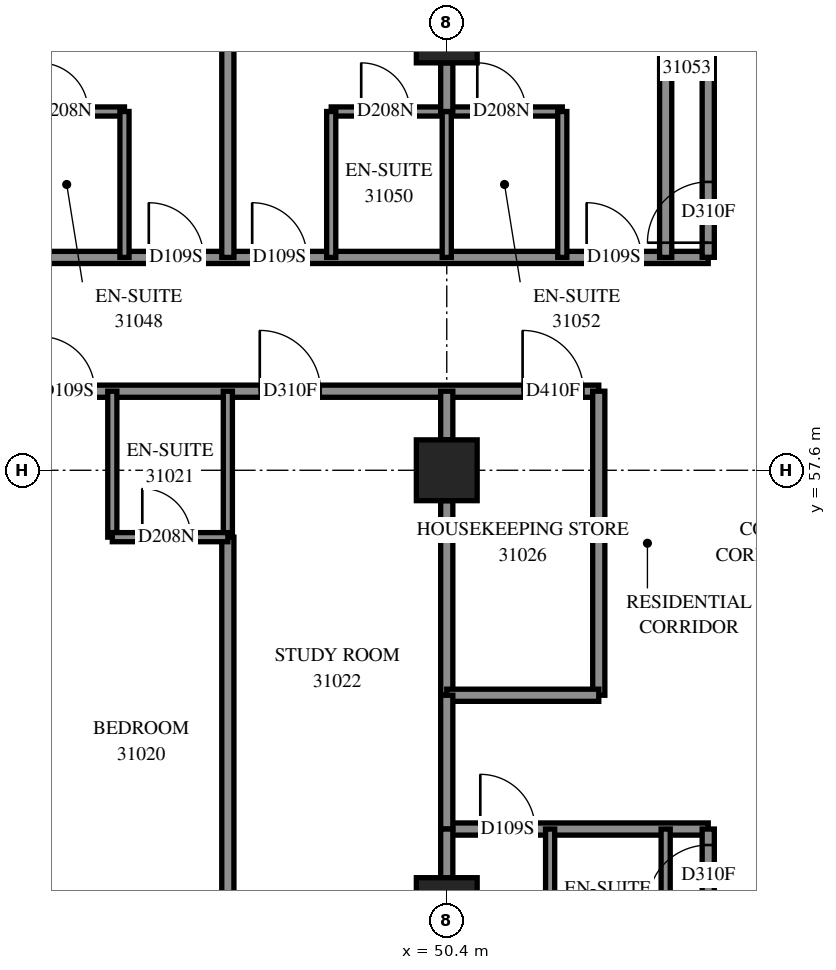
"""IFC4 building model, lengths in metres.
Left out: names, types, materials, properties, quantities, classifications, styles, units other than length and angle.
Written with IfcOpenShell. Run it as: python <this file> out.ifc"""

import sys

from ifc_helpers import new_model, si_unit, direction, frame, frame_2d, origin, origin_2d, place, context, subcontext, project, spatial, rectangle, extrude, element, fill, save


model = new_model("IFC4")
c1 = context("Model", 3, precision=1e-05, world=origin(), true_north=direction((0.0, 1.0)))
c2 = subcontext(c1, "Body", "Model", "MODEL_VIEW")
j1 = project(units=[si_unit("LENGTHUNIT", "METRE"), si_unit("PLANEANGLEUNIT", "RADIAN")], contexts=[c1])
p1 = place(None, origin())
s1 = spatial("IfcSite", under=j1, at=p1, CompositionType="ELEMENT")
p2 = place(p1, origin())
s2 = spatial("IfcBuilding", under=s1, at=p2, CompositionType="ELEMENT")
p3 = place(p2, frame((0.0, 0.0, 115.2)))
s3 = spatial("IfcBuildingStorey", under=s2, at=p3, CompositionType="ELEMENT", Elevation=115.2)
for number, where, z_axis, x_axis in (
    (1, (50.4, 50.4, 0.0), (0.0, 0.0, 1.0), (1.0, 0.0, 0.0)),
    (2, (50.4, 57.6, 0.0), (0.0, 0.0, 1.0), (1.0, 0.0, 0.0)),
    (3, (50.4, 64.8, 0.0), (0.0, 0.0, 1.0), (1.0, 0.0, 0.0)),
):
    element("IfcColumn", number, at=place(p3, frame(where, z_axis=z_axis, x_axis=x_axis)), inside=s3, PredefinedType="COLUMN", context=c2, shape_type="SweptSolid", body=[
        extrude(rectangle(XDim=1.0, YDim=1.0, at=origin_2d()), origin(), (0.0, 0.0, 1.0), 3.1),
    ])
p4 = place(p3, frame((28.802, 58.9, 0.0), z_axis=(0.0, 0.0, 1.0), x_axis=(1.0, 0.0, 0.0)))
e4 = element("IfcWall", 4, at=p4, inside=s3, PredefinedType="PARTITIONING", context=c2, shape_type="SweptSolid", body=[
    extrude(rectangle(XDim=24.098, YDim=0.2, at=frame_2d((12.049, 0.0))), origin(), (0.0, 0.0, 1.0), 3.1),
])
p5 = place(p4, frame((11.323, 0.0, 0.0)))
e5 = element("IfcOpeningElement", 5, at=p5, cuts=e4, PredefinedType="OPENING", context=c2, shape_type="SweptSolid", body=[
    extrude(rectangle(XDim=1.0, YDim=2.1, at=frame_2d((0.5, 1.05))), frame((0.0, 0.11, 0.0), z_axis=(0.0, -1.0, 0.0), x_axis=(1.0, 0.0, 0.0)), (0.0, 0.0, 1.0), 0.22),
])
p6 = place(p4, frame((14.908, 0.0, 0.0)))
e6 = element("IfcOpeningElement", 6, at=p6, cuts=e4, PredefinedType="OPENING", context=c2, shape_type="SweptSolid", body=[
    extrude(rectangle(XDim=0.9, YDim=2.1, at=frame_2d((0.45, 1.05))), frame((0.0, 0.11, 0.0), z_axis=(0.0, -1.0, 0.0), x_axis=(1.0, 0.0, 0.0)), (0.0, 0.0, 1.0), 0.22),
])
p7 = place(p4, frame((18.523, 0.0, 0.0)))
e7 = element("IfcOpeningElement", 7, at=p7, cuts=e4, PredefinedType="OPENING", context=c2, shape_type="SweptSolid", body=[
    extrude(rectangle(XDim=1.0, YDim=2.1, at=frame_2d((0.5, 1.05))), frame((0.0, 0.11, 0.0), z_axis=(0.0, -1.0, 0.0), x_axis=(1.0, 0.0, 0.0)), (0.0, 0.0, 1.0), 0.22),
])
p8 = place(p4, frame((22.845, 0.0, 0.0)))
e8 = element("IfcOpeningElement", 8, at=p8, cuts=e4, PredefinedType="OPENING", context=c2, shape_type="SweptSolid", body=[
    extrude(rectangle(XDim=1.0, YDim=2.1, at=frame_2d((0.5, 1.05))), frame((0.0, 0.11, 0.0), z_axis=(0.0, -1.0, 0.0), x_axis=(1.0, 0.0, 0.0)), (0.0, 0.0, 1.0), 0.22),
])
p9 = place(p3, frame((33.502, 61.1, 0.0), z_axis=(0.0, 0.0, 1.0), x_axis=(1.0, 0.0, 0.0)))
e9 = element("IfcWall", 9, at=p9, inside=s3, PredefinedType="PARTITIONING", context=c2, shape_type="SweptSolid", body=[
    extrude(rectangle(XDim=21.198, YDim=0.2, at=frame_2d((10.599, 0.0))), origin(), (0.0, 0.0, 1.0), 3.1),
])
p10 = place(p9, frame((4.798, 0.0, 0.0)))
e10 = element("IfcOpeningElement", 10, at=p10, cuts=e9, PredefinedType="OPENING", context=c2, shape_type="SweptSolid", body=[
    extrude(rectangle(XDim=0.9, YDim=2.1, at=frame_2d((0.45, 1.05))), frame((0.0, 0.11, 0.0), z_axis=(0.0, -1.0, 0.0), x_axis=(1.0, 0.0, 0.0)), (0.0, 0.0, 1.0), 0.22),
])
p11 = place(p9, frame((6.498, 0.0, 0.0)))
e11 = element("IfcOpeningElement", 11, at=p11, cuts=e9, PredefinedType="OPENING", context=c2, shape_type="SweptSolid", body=[
    extrude(rectangle(XDim=0.9, YDim=2.1, at=frame_2d((0.45, 1.05))), frame((0.0, 0.11, 0.0), z_axis=(0.0, -1.0, 0.0), x_axis=(1.0, 0.0, 0.0)), (0.0, 0.0, 1.0), 0.22),
])
p12 = place(p9, frame((11.998, 0.0, 0.0)))
e12 = element("IfcOpeningElement", 12, at=p12, cuts=e9, PredefinedType="OPENING", context=c2, shape_type="SweptSolid", body=[
    extrude(rectangle(XDim=0.9, YDim=2.1, at=frame_2d((0.45, 1.05))), frame((0.0, 0.11, 0.0), z_axis=(0.0, -1.0, 0.0), x_axis=(1.0, 0.0, 0.0)), (0.0, 0.0, 1.0), 0.22),
])
p13 = place(p9, frame((13.698, 0.0, 0.0)))
e13 = element("IfcOpeningElement", 13, at=p13, cuts=e9, PredefinedType="OPENING", context=c2, shape_type="SweptSolid", body=[
    extrude(rectangle(XDim=0.9, YDim=2.1, at=frame_2d((0.45, 1.05))), frame((0.0, 0.11, 0.0), z_axis=(0.0, -1.0, 0.0), x_axis=(1.0, 0.0, 0.0)), (0.0, 0.0, 1.0), 0.22),
])
p14 = place(p9, frame((19.198, 0.0, 0.0)))
e14 = element("IfcOpeningElement", 14, at=p14, cuts=e9, PredefinedType="OPENING", context=c2, shape_type="SweptSolid", body=[
    extrude(rectangle(XDim=0.9, YDim=2.1, at=frame_2d((0.45, 1.05))), frame((0.0, 0.11, 0.0), z_axis=(0.0, -1.0, 0.0), x_axis=(1.0, 0.0, 0.0)), (0.0, 0.0, 1.0), 0.22),
])
p15 = place(p3, frame((46.8, 61.1, 0.0), z_axis=(0.0, 0.0, 1.0), x_axis=(0.0, 1.0, 0.0)))
e15 = element("IfcWall", 15, at=p15, inside=s3, PredefinedType="PARTITIONING", context=c2, shape_type="SweptSolid", body=[
    extrude(rectangle(XDim=11.688, YDim=0.2, at=frame_2d((5.844, 0.0))), origin(), (0.0, 0.0, 1.0), 3.1),
])
p16 = place(p3, frame((54.0, 61.1, 0.0), z_axis=(0.0, 0.0, 1.0), x_axis=(0.0, 1.0, 0.0)))
e16 = element("IfcWall", 16, at=p16, inside=s3, PredefinedType="PARTITIONING", context=c2, shape_type="SweptSolid", body=[
    extrude(rectangle(XDim=11.621, YDim=0.2, at=frame_2d((5.811, 0.0))), origin(), (0.0, 0.0, 1.0), 3.1),
])
p17 = place(p3, frame((46.8, 49.75, 0.0), z_axis=(0.0, 0.0, 1.0), x_axis=(0.0, 1.0, 0.0)))
e17 = element("IfcWall", 17, at=p17, inside=s3, PredefinedType="PARTITIONING", context=c2, shape_type="SweptSolid", body=[
    extrude(rectangle(XDim=6.75, YDim=0.2, at=frame_2d((3.375, 0.0))), origin(), (0.0, 0.0, 1.0), 3.1),
])
p18 = place(p3, frame((54.7, 61.102, 0.0), z_axis=(0.0, 0.0, 1.0), x_axis=(0.0, 1.0, 0.0)))
e18 = element("IfcWall", 18, at=p18, inside=s3, PredefinedType="PARTITIONING", context=c2, shape_type="SweptSolid", body=[
    extrude(rectangle(XDim=6.598, YDim=0.2, at=frame_2d((3.299, 0.0))), origin(), (0.0, 0.0, 1.0), 3.1),
])
p19 = place(p18, frame((0.24, 0.0, 0.0)))
e19 = element("IfcOpeningElement", 19, at=p19, cuts=e18, PredefinedType="OPENING", context=c2, shape_type="SweptSolid", body=[
    extrude(rectangle(XDim=1.0, YDim=2.1, at=frame_2d((0.5, 1.05))), frame((0.0, 0.11, 0.0), z_axis=(0.0, -1.0, 0.0), x_axis=(1.0, 0.0, 0.0)), (0.0, 0.0, 1.0), 0.22),
])
p20 = place(p3, frame((52.9, 53.9, 0.0), z_axis=(0.0, 0.0, 1.0), x_axis=(0.0, 1.0, 0.0)))
e20 = element("IfcWall", 20, at=p20, inside=s3, PredefinedType="PARTITIONING", context=c2, shape_type="SweptSolid", body=[
    extrude(rectangle(XDim=5.0, YDim=0.2, at=frame_2d((2.5, 0.0))), origin(), (0.0, 0.0, 1.0), 3.1),
])
p21 = place(p3, frame((50.4, 51.7, 0.0), z_axis=(0.0, 0.0, 1.0), x_axis=(1.0, 0.0, 0.0)))
e21 = element("IfcWall", 21, at=p21, inside=s3, PredefinedType="PARTITIONING", context=c2, shape_type="SweptSolid", body=[
    extrude(rectangle(XDim=4.3, YDim=0.2, at=frame_2d((2.15, 0.0))), origin(), (0.0, 0.0, 1.0), 3.1),
])
p22 = place(p21, frame((0.552, 0.0, 0.0)))
e22 = element("IfcOpeningElement", 22, at=p22, cuts=e21, PredefinedType="OPENING", context=c2, shape_type="SweptSolid", body=[
    extrude(rectangle(XDim=0.9, YDim=2.1, at=frame_2d((0.45, 1.05))), frame((0.0, 0.11, 0.0), z_axis=(0.0, -1.0, 0.0), x_axis=(1.0, 0.0, 0.0)), (0.0, 0.0, 1.0), 0.22),
])
p23 = place(p3, frame((54.7, 47.5, 0.0), z_axis=(0.0, 0.0, 1.0), x_axis=(0.0, 1.0, 0.0)))
e23 = element("IfcWall", 23, at=p23, inside=s3, PredefinedType="PARTITIONING", context=c2, shape_type="SweptSolid", body=[
    extrude(rectangle(XDim=4.2, YDim=0.2, at=frame_2d((2.1, 0.0))), origin(), (0.0, 0.0, 1.0), 3.1),
])
p24 = place(p23, frame((2.937, 0.0, 0.0)))
e24 = element("IfcOpeningElement", 24, at=p24, cuts=e23, PredefinedType="OPENING", context=c2, shape_type="SweptSolid", body=[
    extrude(rectangle(XDim=1.0, YDim=2.1, at=frame_2d((0.5, 1.05))), frame((0.0, 0.11, 0.0), z_axis=(0.0, -1.0, 0.0), x_axis=(1.0, 0.0, 0.0)), (0.0, 0.0, 1.0), 0.22),
])
p25 = place(p3, frame((41.3, 63.5, 0.0), z_axis=(0.0, 0.0, 1.0), x_axis=(1.0, 0.0, 0.0)))
e25 = element("IfcWall", 25, at=p25, inside=s3, PredefinedType="PARTITIONING", context=c2, shape_type="SweptSolid", body=[
    extrude(rectangle(XDim=3.8, YDim=0.15, at=frame_2d((1.9, 0.0))), origin(), (0.0, 0.0, 1.0), 3.1),
])
p26 = place(p25, frame((0.493, 0.0, 0.0)))
e26 = element("IfcOpeningElement", 26, at=p26, cuts=e25, PredefinedType="OPENING", context=c2, shape_type="SweptSolid", body=[
    extrude(rectangle(XDim=0.8, YDim=2.1, at=frame_2d((0.4, 1.05))), frame((0.0, 0.085, 0.0), z_axis=(0.0, -1.0, 0.0), x_axis=(1.0, 0.0, 0.0)), (0.0, 0.0, 1.0), 0.17),
])
p27 = place(p25, frame((2.402, 0.0, 0.0)))
e27 = element("IfcOpeningElement", 27, at=p27, cuts=e25, PredefinedType="OPENING", context=c2, shape_type="SweptSolid", body=[
    extrude(rectangle(XDim=0.8, YDim=2.1, at=frame_2d((0.4, 1.05))), frame((0.0, 0.085, 0.0), z_axis=(0.0, -1.0, 0.0), x_axis=(1.0, 0.0, 0.0)), (0.0, 0.0, 1.0), 0.17),
])
p28 = place(p3, frame((48.5, 63.5, 0.0), z_axis=(0.0, 0.0, 1.0), x_axis=(1.0, 0.0, 0.0)))
e28 = element("IfcWall", 28, at=p28, inside=s3, PredefinedType="PARTITIONING", context=c2, shape_type="SweptSolid", body=[
    extrude(rectangle(XDim=3.8, YDim=0.15, at=frame_2d((1.9, 0.0))), origin(), (0.0, 0.0, 1.0), 3.1),
])
p29 = place(p28, frame((0.493, 0.0, 0.0)))
e29 = element("IfcOpeningElement", 29, at=p29, cuts=e28, PredefinedType="OPENING", context=c2, shape_type="SweptSolid", body=[
    extrude(rectangle(XDim=0.8, YDim=2.1, at=frame_2d((0.4, 1.05))), frame((0.0, 0.085, 0.0), z_axis=(0.0, -1.0, 0.0), x_axis=(1.0, 0.0, 0.0)), (0.0, 0.0, 1.0), 0.17),
])
p30 = place(p28, frame((2.402, 0.0, 0.0)))
e30 = element("IfcOpeningElement", 30, at=p30, cuts=e28, PredefinedType="OPENING", context=c2, shape_type="SweptSolid", body=[
    extrude(rectangle(XDim=0.8, YDim=2.1, at=frame_2d((0.4, 1.05))), frame((0.0, 0.085, 0.0), z_axis=(0.0, -1.0, 0.0), x_axis=(1.0, 0.0, 0.0)), (0.0, 0.0, 1.0), 0.17),
])
p31 = place(p3, frame((50.4, 53.9, 0.0), z_axis=(0.0, 0.0, 1.0), x_axis=(0.0, 1.0, 0.0)))
e31 = element("IfcWall", 31, at=p31, inside=s3, PredefinedType="PARTITIONING", context=c2, shape_type="SweptSolid", body=[
    extrude(rectangle(XDim=3.2, YDim=0.2, at=frame_2d((1.6, 0.0))), origin(), (0.0, 0.0, 1.0), 3.1),
])
p32 = place(p3, frame((50.4, 53.9, 0.0), z_axis=(0.0, 0.0, 1.0), x_axis=(1.0, 0.0, 0.0)))
e32 = element("IfcWall", 32, at=p32, inside=s3, PredefinedType="PARTITIONING", context=c2, shape_type="SweptSolid", body=[
    extrude(rectangle(XDim=2.5, YDim=0.2, at=frame_2d((1.25, 0.0))), origin(), (0.0, 0.0, 1.0), 3.1),
])
for number, where, z_axis, x_axis in (
    (33, (52.1, 49.3, 0.0), (0.0, 0.0, 1.0), (0.0, 1.0, 0.0)),
    (34, (54.0, 49.3, 0.0), (0.0, 0.0, 1.0), (0.0, 1.0, 0.0)),
    (35, (45.1, 61.1, 0.0), (0.0, 0.0, 1.0), (0.0, 1.0, 0.0)),
    (36, (44.9, 56.5, 0.0), (0.0, 0.0, 1.0), (0.0, 1.0, 0.0)),
    (37, (46.8, 56.5, 0.0), (0.0, 0.0, 1.0), (0.0, 1.0, 0.0)),
    (38, (48.5, 61.1, 0.0), (0.0, 0.0, 1.0), (0.0, 1.0, 0.0)),
    (39, (50.4, 61.1, 0.0), (0.0, 0.0, 1.0), (0.0, 1.0, 0.0)),
    (40, (52.3, 61.1, 0.0), (0.0, 0.0, 1.0), (0.0, 1.0, 0.0)),
):
    element("IfcWall", number, at=place(p3, frame(where, z_axis=z_axis, x_axis=x_axis)), inside=s3, PredefinedType="PARTITIONING", context=c2, shape_type="SweptSolid", body=[
        extrude(rectangle(XDim=2.4, YDim=0.15, at=frame_2d((1.2, 0.0))), origin(), (0.0, 0.0, 1.0), 3.1),
    ])
p33 = place(p3, frame((50.4, 51.7, 0.0), z_axis=(0.0, 0.0, 1.0), x_axis=(0.0, 1.0, 0.0)))
e41 = element("IfcWall", 41, at=p33, inside=s3, PredefinedType="PARTITIONING", context=c2, shape_type="SweptSolid", body=[
    extrude(rectangle(XDim=2.2, YDim=0.2, at=frame_2d((1.1, 0.0))), origin(), (0.0, 0.0, 1.0), 3.1),
])
p34 = place(p3, frame((44.9, 56.5, 0.0), z_axis=(0.0, 0.0, 1.0), x_axis=(1.0, 0.0, 0.0)))
e42 = element("IfcWall", 42, at=p34, inside=s3, PredefinedType="PARTITIONING", context=c2, shape_type="SweptSolid", body=[
    extrude(rectangle(XDim=1.9, YDim=0.15, at=frame_2d((0.95, 0.0))), origin(), (0.0, 0.0, 1.0), 3.1),
])
p35 = place(p34, frame((0.493, 0.0, 0.0)))
e43 = element("IfcOpeningElement", 43, at=p35, cuts=e42, PredefinedType="OPENING", context=c2, shape_type="SweptSolid", body=[
    extrude(rectangle(XDim=0.8, YDim=2.1, at=frame_2d((0.4, 1.05))), frame((0.0, 0.085, 0.0), z_axis=(0.0, -1.0, 0.0), x_axis=(1.0, 0.0, 0.0)), (0.0, 0.0, 1.0), 0.17),
])
for number, where, z_axis, x_axis in (
    (44, (50.4, 50.9, 0.0), (0.0, 0.0, 1.0), (0.0, 1.0, 0.0)),
    (45, (50.4, 58.1, 0.0), (0.0, 0.0, 1.0), (0.0, 1.0, 0.0)),
    (46, (50.4, 63.5, 0.0), (0.0, 0.0, 1.0), (0.0, 1.0, 0.0)),
):
    element("IfcWall", number, at=place(p3, frame(where, z_axis=z_axis, x_axis=x_axis)), inside=s3, PredefinedType="PARTITIONING", context=c2, shape_type="SweptSolid", body=[
        extrude(rectangle(XDim=0.8, YDim=0.2, at=frame_2d((0.4, 0.0))), origin(), (0.0, 0.0, 1.0), 3.1),
    ])
p36 = place(p6, origin())
e47 = element("IfcDoor", 47, at=p36, inside=s3, OperationType="SINGLE_SWING_LEFT", PredefinedType="DOOR", context=c2, shape_type="SweptSolid", body=[
    extrude(rectangle(XDim=0.9, YDim=2.1, at=frame_2d((0.45, 1.05))), frame((0.0, 0.025, 0.0), z_axis=(0.0, -1.0, 0.0), x_axis=(1.0, 0.0, 0.0)), (0.0, 0.0, 1.0), 0.05),
])
fill(e6, e47)
p37 = place(p35, origin())
e48 = element("IfcDoor", 48, at=p37, inside=s3, OperationType="SINGLE_SWING_RIGHT", PredefinedType="DOOR", context=c2, shape_type="SweptSolid", body=[
    extrude(rectangle(XDim=0.8, YDim=2.1, at=frame_2d((0.4, 1.05))), frame((0.0, 0.025, 0.0), z_axis=(0.0, -1.0, 0.0), x_axis=(1.0, 0.0, 0.0)), (0.0, 0.0, 1.0), 0.05),
])
fill(e43, e48)
p38 = place(p7, origin())
e49 = element("IfcDoor", 49, at=p38, inside=s3, OperationType="SINGLE_SWING_RIGHT", PredefinedType="DOOR", context=c2, shape_type="SweptSolid", body=[
    extrude(rectangle(XDim=1.0, YDim=2.1, at=frame_2d((0.5, 1.05))), frame((0.0, 0.025, 0.0), z_axis=(0.0, -1.0, 0.0), x_axis=(1.0, 0.0, 0.0)), (0.0, 0.0, 1.0), 0.05),
])
fill(e7, e49)
p39 = place(p22, origin())
e50 = element("IfcDoor", 50, at=p39, inside=s3, OperationType="SINGLE_SWING_LEFT", PredefinedType="DOOR", context=c2, shape_type="SweptSolid", body=[
    extrude(rectangle(XDim=0.9, YDim=2.1, at=frame_2d((0.45, 1.05))), frame((0.0, 0.025, 0.0), z_axis=(0.0, -1.0, 0.0), x_axis=(1.0, 0.0, 0.0)), (0.0, 0.0, 1.0), 0.05),
])
fill(e22, e50)
p40 = place(p24, origin())
e51 = element("IfcDoor", 51, at=p40, inside=s3, OperationType="SINGLE_SWING_RIGHT", PredefinedType="DOOR", context=c2, shape_type="SweptSolid", body=[
    extrude(rectangle(XDim=1.0, YDim=2.1, at=frame_2d((0.5, 1.05))), frame((0.0, 0.025, 0.0), z_axis=(0.0, -1.0, 0.0), x_axis=(1.0, 0.0, 0.0)), (0.0, 0.0, 1.0), 0.05),
])
fill(e24, e51)
p41 = place(p8, origin())
e52 = element("IfcDoor", 52, at=p41, inside=s3, OperationType="SINGLE_SWING_LEFT", PredefinedType="DOOR", context=c2, shape_type="SweptSolid", body=[
    extrude(rectangle(XDim=1.0, YDim=2.1, at=frame_2d((0.5, 1.05))), frame((0.0, 0.025, 0.0), z_axis=(0.0, -1.0, 0.0), x_axis=(1.0, 0.0, 0.0)), (0.0, 0.0, 1.0), 0.05),
])
fill(e8, e52)
p42 = place(p12, origin())
e53 = element("IfcDoor", 53, at=p42, inside=s3, OperationType="SINGLE_SWING_RIGHT", PredefinedType="DOOR", context=c2, shape_type="SweptSolid", body=[
    extrude(rectangle(XDim=0.9, YDim=2.1, at=frame_2d((0.45, 1.05))), frame((0.0, 0.025, 0.0), z_axis=(0.0, -1.0, 0.0), x_axis=(1.0, 0.0, 0.0)), (0.0, 0.0, 1.0), 0.05),
])
fill(e12, e53)
p43 = place(p27, origin())
e54 = element("IfcDoor", 54, at=p43, inside=s3, OperationType="SINGLE_SWING_RIGHT", PredefinedType="DOOR", context=c2, shape_type="SweptSolid", body=[
    extrude(rectangle(XDim=0.8, YDim=2.1, at=frame_2d((0.4, 1.05))), frame((0.0, 0.025, 0.0), z_axis=(0.0, -1.0, 0.0), x_axis=(1.0, 0.0, 0.0)), (0.0, 0.0, 1.0), 0.05),
])
fill(e27, e54)
p44 = place(p13, origin())
e55 = element("IfcDoor", 55, at=p44, inside=s3, OperationType="SINGLE_SWING_LEFT", PredefinedType="DOOR", context=c2, shape_type="SweptSolid", body=[
    extrude(rectangle(XDim=0.9, YDim=2.1, at=frame_2d((0.45, 1.05))), frame((0.0, 0.025, 0.0), z_axis=(0.0, -1.0, 0.0), x_axis=(1.0, 0.0, 0.0)), (0.0, 0.0, 1.0), 0.05),
])
fill(e13, e55)
p45 = place(p29, origin())
e56 = element("IfcDoor", 56, at=p45, inside=s3, OperationType="SINGLE_SWING_RIGHT", PredefinedType="DOOR", context=c2, shape_type="SweptSolid", body=[
    extrude(rectangle(XDim=0.8, YDim=2.1, at=frame_2d((0.4, 1.05))), frame((0.0, 0.025, 0.0), z_axis=(0.0, -1.0, 0.0), x_axis=(1.0, 0.0, 0.0)), (0.0, 0.0, 1.0), 0.05),
])
fill(e29, e56)
p46 = place(p14, origin())
e57 = element("IfcDoor", 57, at=p46, inside=s3, OperationType="SINGLE_SWING_RIGHT", PredefinedType="DOOR", context=c2, shape_type="SweptSolid", body=[
    extrude(rectangle(XDim=0.9, YDim=2.1, at=frame_2d((0.45, 1.05))), frame((0.0, 0.025, 0.0), z_axis=(0.0, -1.0, 0.0), x_axis=(1.0, 0.0, 0.0)), (0.0, 0.0, 1.0), 0.05),
])
fill(e14, e57)
p47 = place(p30, origin())
e58 = element("IfcDoor", 58, at=p47, inside=s3, OperationType="SINGLE_SWING_RIGHT", PredefinedType="DOOR", context=c2, shape_type="SweptSolid", body=[
    extrude(rectangle(XDim=0.8, YDim=2.1, at=frame_2d((0.4, 1.05))), frame((0.0, 0.025, 0.0), z_axis=(0.0, -1.0, 0.0), x_axis=(1.0, 0.0, 0.0)), (0.0, 0.0, 1.0), 0.05),
])
fill(e30, e58)
p48 = place(p19, origin())
e59 = element("IfcDoor", 59, at=p48, inside=s3, OperationType="SINGLE_SWING_LEFT", PredefinedType="DOOR", context=c2, shape_type="SweptSolid", body=[
    extrude(rectangle(XDim=1.0, YDim=2.1, at=frame_2d((0.5, 1.05))), frame((0.0, 0.025, 0.0), z_axis=(0.0, -1.0, 0.0), x_axis=(1.0, 0.0, 0.0)), (0.0, 0.0, 1.0), 0.05),
])
fill(e19, e59)
save(model, sys.argv[1])
